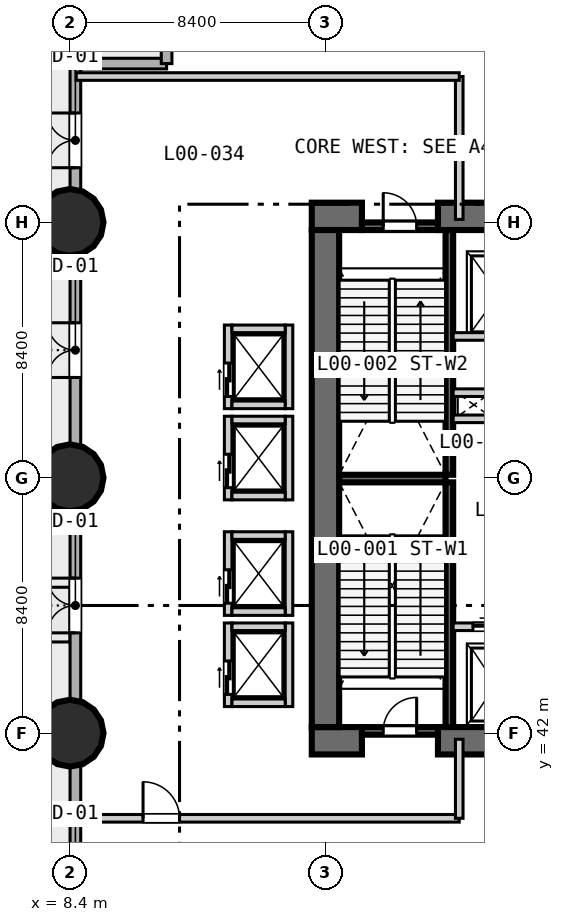
"""IFC4 building model, lengths in metres.
Left out: names, types, materials, properties, quantities, classifications, styles, units other than length and angle.
Written with IfcOpenShell. Run it as: python <this file> out.ifc"""

import sys

from ifc_helpers import new_model, si_unit, direction, frame, frame_2d, origin, origin_2d, place, context, subcontext, project, spatial, rectangle, circle, extrude, element, fill, save


model = new_model("IFC4")
c1 = context("Model", 3, precision=1e-05, world=origin(), true_north=direction((0.0, 1.0)))
c2 = subcontext(c1, "Body", "Model", "MODEL_VIEW")
j1 = project(units=[si_unit("LENGTHUNIT", "METRE"), si_unit("PLANEANGLEUNIT", "RADIAN")], contexts=[c1])
p1 = place(None, origin())
s1 = spatial("IfcSite", under=j1, at=p1, CompositionType="ELEMENT")
p2 = place(p1, origin())
s2 = spatial("IfcBuilding", under=s1, at=p2, CompositionType="ELEMENT")
p3 = place(p2, origin())
s3 = spatial("IfcBuildingStorey", under=s2, at=p3, CompositionType="ELEMENT", Elevation=0.0)
for number, where, z_axis, x_axis in (
    (1, (20.875, 42.2, 0.0), (0.0, 0.0, 1.0), (0.0, 1.0, 0.0)),
    (2, (20.875, 50.5, 0.0), (0.0, 0.0, 1.0), (0.0, 1.0, 0.0)),
):
    element("IfcWall", number, at=place(p3, frame(where, z_axis=z_axis, x_axis=x_axis)), inside=s3, PredefinedType="SOLIDWALL", context=c2, shape_type="SweptSolid", body=[
        extrude(rectangle(XDim=8.05, YDim=0.25, at=frame_2d((4.025, 0.0))), origin(), (0.0, 0.0, 1.0), 5.65),
    ])
p4 = place(p3, frame((17.25, 50.375, 0.0), z_axis=(0.0, 0.0, 1.0), x_axis=(1.0, 0.0, 0.0)))
e3 = element("IfcWall", 3, at=p4, inside=s3, PredefinedType="SOLIDWALL", context=c2, shape_type="SweptSolid", body=[
    extrude(rectangle(XDim=3.5, YDim=0.25, at=frame_2d((1.75, 0.0))), origin(), (0.0, 0.0, 1.0), 5.65),
])
p5 = place(p3, frame((16.35, 41.75, 0.0), z_axis=(0.0, 0.0, 1.0), x_axis=(1.0, 0.0, 0.0)))
e4 = element("IfcWall", 4, at=p5, inside=s3, PredefinedType="SHEAR", context=c2, shape_type="SweptSolid", body=[
    extrude(rectangle(XDim=1.65, YDim=0.9, at=frame_2d((0.825, 0.0))), origin(), (0.0, 0.0, 1.0), 5.65),
])
p6 = place(p3, frame((20.5, 41.75, 0.0), z_axis=(0.0, 0.0, 1.0), x_axis=(1.0, 0.0, 0.0)))
e5 = element("IfcWall", 5, at=p6, inside=s3, PredefinedType="SHEAR", context=c2, shape_type="SweptSolid", body=[
    extrude(rectangle(XDim=5.15, YDim=0.9, at=frame_2d((2.575, 0.0))), origin(), (0.0, 0.0, 1.0), 5.65),
])
p7 = place(p3, frame((16.35, 59.0, 0.0), z_axis=(0.0, 0.0, 1.0), x_axis=(1.0, 0.0, 0.0)))
e6 = element("IfcWall", 6, at=p7, inside=s3, PredefinedType="SHEAR", context=c2, shape_type="SweptSolid", body=[
    extrude(rectangle(XDim=1.65, YDim=0.9, at=frame_2d((0.825, 0.0))), origin(), (0.0, 0.0, 1.0), 5.65),
])
p8 = place(p3, frame((20.5, 59.0, 0.0), z_axis=(0.0, 0.0, 1.0), x_axis=(1.0, 0.0, 0.0)))
e7 = element("IfcWall", 7, at=p8, inside=s3, PredefinedType="SHEAR", context=c2, shape_type="SweptSolid", body=[
    extrude(rectangle(XDim=5.15, YDim=0.9, at=frame_2d((2.575, 0.0))), origin(), (0.0, 0.0, 1.0), 5.65),
])
p9 = place(p3, frame((16.8, 42.2, 0.0), z_axis=(0.0, 0.0, 1.0), x_axis=(0.0, 1.0, 0.0)))
e8 = element("IfcWall", 8, at=p9, inside=s3, PredefinedType="SHEAR", context=c2, shape_type="SweptSolid", body=[
    extrude(rectangle(XDim=16.35, YDim=0.9, at=frame_2d((8.175, 0.0))), origin(), (0.0, 0.0, 1.0), 5.65),
])
for number, where, z_axis, x_axis in (
    (9, (8.4, 42.0, 0.0), (0.0, 0.0, 1.0), (1.0, 0.0, 0.0)),
    (10, (8.4, 50.4, 0.0), (0.0, 0.0, 1.0), (1.0, 0.0, 0.0)),
    (11, (8.4, 58.8, 0.0), (0.0, 0.0, 1.0), (1.0, 0.0, 0.0)),
):
    element("IfcColumn", number, at=place(p3, frame(where, z_axis=z_axis, x_axis=x_axis)), inside=s3, PredefinedType="USERDEFINED", context=c2, shape_type="SweptSolid", body=[
        extrude(circle(Radius=1.1, at=origin_2d()), origin(), (0.0, 0.0, 1.0), 6.0),
    ])
p10 = place(p3, frame((8.575, 11.575, 0.0), z_axis=(0.0, 0.0, 1.0), x_axis=(0.0, 1.0, 0.0)))
e12 = element("IfcWall", 12, at=p10, inside=s3, PredefinedType="STANDARD", context=c2, shape_type="SweptSolid", body=[
    extrude(rectangle(XDim=52.45, YDim=0.35, at=frame_2d((26.225, 0.0))), origin(), (0.0, 0.0, 1.0), 4.8),
])
p11 = place(p10, frame((24.125, 0.0, 0.0)))
e13 = element("IfcOpeningElement", 13, at=p11, cuts=e12, PredefinedType="OPENING", context=c2, shape_type="SweptSolid", body=[
    extrude(rectangle(XDim=1.8, YDim=2.2, at=frame_2d((0.9, 1.1))), frame((0.0, 0.185, 0.0), z_axis=(0.0, -1.0, 0.0), x_axis=(1.0, 0.0, 0.0)), (0.0, 0.0, 1.0), 0.37),
])
p12 = place(p10, frame((33.725, 0.0, 0.0)))
e14 = element("IfcOpeningElement", 14, at=p12, cuts=e12, PredefinedType="OPENING", context=c2, shape_type="SweptSolid", body=[
    extrude(rectangle(XDim=1.8, YDim=2.2, at=frame_2d((0.9, 1.1))), frame((0.0, 0.185, 0.0), z_axis=(0.0, -1.0, 0.0), x_axis=(1.0, 0.0, 0.0)), (0.0, 0.0, 1.0), 0.37),
])
p13 = place(p10, frame((42.125, 0.0, 0.0)))
e15 = element("IfcOpeningElement", 15, at=p13, cuts=e12, PredefinedType="OPENING", context=c2, shape_type="SweptSolid", body=[
    extrude(rectangle(XDim=1.8, YDim=2.2, at=frame_2d((0.9, 1.1))), frame((0.0, 0.185, 0.0), z_axis=(0.0, -1.0, 0.0), x_axis=(1.0, 0.0, 0.0)), (0.0, 0.0, 1.0), 0.37),
])
p14 = place(p10, frame((49.025, 0.0, 0.0)))
e16 = element("IfcOpeningElement", 16, at=p14, cuts=e12, PredefinedType="OPENING", context=c2, shape_type="SweptSolid", body=[
    extrude(rectangle(XDim=1.8, YDim=2.2, at=frame_2d((0.9, 1.1))), frame((0.0, 0.185, 0.0), z_axis=(0.0, -1.0, 0.0), x_axis=(1.0, 0.0, 0.0)), (0.0, 0.0, 1.0), 0.37),
])
p15 = place(p10, frame((16.925, 0.0, 0.0)))
e17 = element("IfcOpeningElement", 17, at=p15, cuts=e12, PredefinedType="OPENING", context=c2, shape_type="SweptSolid", body=[
    extrude(rectangle(XDim=1.8, YDim=2.2, at=frame_2d((0.9, 1.1))), frame((0.0, 0.185, 0.0), z_axis=(0.0, -1.0, 0.0), x_axis=(1.0, 0.0, 0.0)), (0.0, 0.0, 1.0), 0.37),
])
p16 = place(p10, frame((8.825, 0.0, 0.0)))
e18 = element("IfcOpeningElement", 18, at=p16, cuts=e12, PredefinedType="OPENING", context=c2, shape_type="SweptSolid", body=[
    extrude(rectangle(XDim=1.2, YDim=2.15, at=frame_2d((0.6, 1.075))), frame((0.0, 0.185, 0.0), z_axis=(0.0, -1.0, 0.0), x_axis=(1.0, 0.0, 0.0)), (0.0, 0.0, 1.0), 0.37),
])
for number, where, z_axis, x_axis in (
    (19, (8.575, 64.025, 0.0), (0.0, 0.0, 1.0), (1.0, 0.0, 0.0)),
    (20, (11.575, 64.025, 0.0), (0.0, 0.0, 1.0), (0.0, 1.0, 0.0)),
):
    element("IfcWall", number, at=place(p3, frame(where, z_axis=z_axis, x_axis=x_axis)), inside=s3, PredefinedType="STANDARD", context=c2, shape_type="SweptSolid", body=[
        extrude(rectangle(XDim=3.0, YDim=0.35, at=frame_2d((1.5, 0.0))), origin(), (0.0, 0.0, 1.0), 5.65),
    ])
p17 = place(p3, frame((18.0, 42.075, 0.0), z_axis=(0.0, 0.0, 1.0), x_axis=(1.0, 0.0, 0.0)))
e21 = element("IfcWall", 21, at=p17, inside=s3, PredefinedType="SOLIDWALL", context=c2, shape_type="SweptSolid", body=[
    extrude(rectangle(XDim=2.5, YDim=0.25, at=frame_2d((1.25, 0.0))), origin(), (0.0, 0.0, 1.0), 5.65),
])
p18 = place(p17, frame((0.7, 0.0, 0.0)))
e22 = element("IfcOpeningElement", 22, at=p18, cuts=e21, PredefinedType="OPENING", context=c2, shape_type="SweptSolid", body=[
    extrude(rectangle(XDim=1.1, YDim=2.15, at=frame_2d((0.55, 1.075))), frame((0.0, 0.135, 0.0), z_axis=(0.0, -1.0, 0.0), x_axis=(1.0, 0.0, 0.0)), (0.0, 0.0, 1.0), 0.27),
])
p19 = place(p3, frame((18.0, 58.675, 0.0), z_axis=(0.0, 0.0, 1.0), x_axis=(1.0, 0.0, 0.0)))
e23 = element("IfcWall", 23, at=p19, inside=s3, PredefinedType="SOLIDWALL", context=c2, shape_type="SweptSolid", body=[
    extrude(rectangle(XDim=2.5, YDim=0.25, at=frame_2d((1.25, 0.0))), origin(), (0.0, 0.0, 1.0), 5.65),
])
p20 = place(p19, frame((0.7, 0.0, 0.0)))
e24 = element("IfcOpeningElement", 24, at=p20, cuts=e23, PredefinedType="OPENING", context=c2, shape_type="SweptSolid", body=[
    extrude(rectangle(XDim=1.1, YDim=2.15, at=frame_2d((0.55, 1.075))), frame((0.0, 0.135, 0.0), z_axis=(0.0, -1.0, 0.0), x_axis=(1.0, 0.0, 0.0)), (0.0, 0.0, 1.0), 0.27),
])
p21 = place(p3, frame((21.0, 45.5, 0.0), z_axis=(0.0, 0.0, 1.0), x_axis=(1.0, 0.0, 0.0)))
e25 = element("IfcWall", 25, at=p21, inside=s3, PredefinedType="SOLIDWALL", context=c2, shape_type="SweptSolid", body=[
    extrude(rectangle(XDim=4.15, YDim=0.25, at=frame_2d((2.075, 0.0))), origin(), (0.0, 0.0, 1.0), 5.65),
])
p22 = place(p21, frame((0.65, 0.0, 0.0)))
e26 = element("IfcOpeningElement", 26, at=p22, cuts=e25, PredefinedType="OPENING", context=c2, shape_type="SweptSolid", body=[
    extrude(rectangle(XDim=1.1, YDim=2.15, at=frame_2d((0.55, 1.075))), frame((0.0, 0.135, 0.0), z_axis=(0.0, -1.0, 0.0), x_axis=(1.0, 0.0, 0.0)), (0.0, 0.0, 1.0), 0.27),
])
p23 = place(p3, frame((21.0, 52.34, 0.0), z_axis=(0.0, 0.0, 1.0), x_axis=(1.0, 0.0, 0.0)))
e27 = element("IfcWall", 27, at=p23, inside=s3, PredefinedType="SOLIDWALL", context=c2, shape_type="SweptSolid", body=[
    extrude(rectangle(XDim=3.75, YDim=0.25, at=frame_2d((1.875, 0.0))), origin(), (0.0, 0.0, 1.0), 5.65),
])
p24 = place(p3, frame((21.0, 55.05, 0.0), z_axis=(0.0, 0.0, 1.0), x_axis=(1.0, 0.0, 0.0)))
e28 = element("IfcWall", 28, at=p24, inside=s3, PredefinedType="SOLIDWALL", context=c2, shape_type="SweptSolid", body=[
    extrude(rectangle(XDim=4.15, YDim=0.25, at=frame_2d((2.075, 0.0))), origin(), (0.0, 0.0, 1.0), 5.65),
])
p25 = place(p24, frame((1.85, 0.0, 0.0)))
e29 = element("IfcOpeningElement", 29, at=p25, cuts=e28, PredefinedType="OPENING", context=c2, shape_type="SweptSolid", body=[
    extrude(rectangle(XDim=1.1, YDim=2.15, at=frame_2d((0.55, 1.075))), frame((0.0, 0.135, 0.0), z_axis=(0.0, -1.0, 0.0), x_axis=(1.0, 0.0, 0.0)), (0.0, 0.0, 1.0), 0.27),
])
p26 = place(p3, frame((21.0, 53.2, 0.0), z_axis=(0.0, 0.0, 1.0), x_axis=(1.0, 0.0, 0.0)))
e30 = element("IfcWall", 30, at=p26, inside=s3, PredefinedType="SOLIDWALL", context=c2, shape_type="SweptSolid", body=[
    extrude(rectangle(XDim=1.3, YDim=0.25, at=frame_2d((0.65, 0.0))), origin(), (0.0, 0.0, 1.0), 5.65),
])
p27 = place(p3, frame((13.6, 42.875, 0.0), z_axis=(0.0, 0.0, 1.0), x_axis=(0.0, 1.0, 0.0)))
e31 = element("IfcWall", 31, at=p27, inside=s3, PredefinedType="SOLIDWALL", context=c2, shape_type="SweptSolid", body=[
    extrude(rectangle(XDim=2.75, YDim=0.25, at=frame_2d((1.375, 0.0))), origin(), (0.0, 0.0, 1.0), 5.65),
])
p28 = place(p27, frame((0.4, 0.0, 0.0)))
e32 = element("IfcOpeningElement", 32, at=p28, cuts=e31, PredefinedType="OPENING", context=c2, shape_type="SweptSolid", body=[
    extrude(rectangle(XDim=1.1, YDim=2.15, at=frame_2d((0.55, 1.075))), frame((0.0, 0.135, 0.0), z_axis=(0.0, -1.0, 0.0), x_axis=(1.0, 0.0, 0.0)), (0.0, 0.0, 1.0), 0.27),
])
p29 = place(p3, frame((15.6, 42.875, 0.0), z_axis=(0.0, 0.0, 1.0), x_axis=(0.0, 1.0, 0.0)))
e33 = element("IfcWall", 33, at=p29, inside=s3, PredefinedType="SOLIDWALL", context=c2, shape_type="SweptSolid", body=[
    extrude(rectangle(XDim=2.75, YDim=0.25, at=frame_2d((1.375, 0.0))), origin(), (0.0, 0.0, 1.0), 5.65),
])
for number, where, z_axis, x_axis in (
    (34, (13.725, 43.0, 0.0), (0.0, 0.0, 1.0), (1.0, 0.0, 0.0)),
    (35, (13.725, 45.5, 0.0), (0.0, 0.0, 1.0), (1.0, 0.0, 0.0)),
):
    element("IfcWall", number, at=place(p3, frame(where, z_axis=z_axis, x_axis=x_axis)), inside=s3, PredefinedType="SOLIDWALL", context=c2, shape_type="SweptSolid", body=[
        extrude(rectangle(XDim=1.75, YDim=0.25, at=frame_2d((0.875, 0.0))), origin(), (0.0, 0.0, 1.0), 5.65),
    ])
p30 = place(p3, frame((13.6, 45.875, 0.0), z_axis=(0.0, 0.0, 1.0), x_axis=(0.0, 1.0, 0.0)))
e36 = element("IfcWall", 36, at=p30, inside=s3, PredefinedType="SOLIDWALL", context=c2, shape_type="SweptSolid", body=[
    extrude(rectangle(XDim=2.75, YDim=0.25, at=frame_2d((1.375, 0.0))), origin(), (0.0, 0.0, 1.0), 5.65),
])
p31 = place(p30, frame((0.4, 0.0, 0.0)))
e37 = element("IfcOpeningElement", 37, at=p31, cuts=e36, PredefinedType="OPENING", context=c2, shape_type="SweptSolid", body=[
    extrude(rectangle(XDim=1.1, YDim=2.15, at=frame_2d((0.55, 1.075))), frame((0.0, 0.135, 0.0), z_axis=(0.0, -1.0, 0.0), x_axis=(1.0, 0.0, 0.0)), (0.0, 0.0, 1.0), 0.27),
])
p32 = place(p3, frame((15.6, 45.875, 0.0), z_axis=(0.0, 0.0, 1.0), x_axis=(0.0, 1.0, 0.0)))
e38 = element("IfcWall", 38, at=p32, inside=s3, PredefinedType="SOLIDWALL", context=c2, shape_type="SweptSolid", body=[
    extrude(rectangle(XDim=2.75, YDim=0.25, at=frame_2d((1.375, 0.0))), origin(), (0.0, 0.0, 1.0), 5.65),
])
for number, where, z_axis, x_axis in (
    (39, (13.725, 46.0, 0.0), (0.0, 0.0, 1.0), (1.0, 0.0, 0.0)),
    (40, (13.725, 48.5, 0.0), (0.0, 0.0, 1.0), (1.0, 0.0, 0.0)),
):
    element("IfcWall", number, at=place(p3, frame(where, z_axis=z_axis, x_axis=x_axis)), inside=s3, PredefinedType="SOLIDWALL", context=c2, shape_type="SweptSolid", body=[
        extrude(rectangle(XDim=1.75, YDim=0.25, at=frame_2d((0.875, 0.0))), origin(), (0.0, 0.0, 1.0), 5.65),
    ])
p33 = place(p3, frame((13.6, 49.675, 0.0), z_axis=(0.0, 0.0, 1.0), x_axis=(0.0, 1.0, 0.0)))
e41 = element("IfcWall", 41, at=p33, inside=s3, PredefinedType="SOLIDWALL", context=c2, shape_type="SweptSolid", body=[
    extrude(rectangle(XDim=2.75, YDim=0.25, at=frame_2d((1.375, 0.0))), origin(), (0.0, 0.0, 1.0), 5.65),
])
p34 = place(p33, frame((0.4, 0.0, 0.0)))
e42 = element("IfcOpeningElement", 42, at=p34, cuts=e41, PredefinedType="OPENING", context=c2, shape_type="SweptSolid", body=[
    extrude(rectangle(XDim=1.1, YDim=2.15, at=frame_2d((0.55, 1.075))), frame((0.0, 0.135, 0.0), z_axis=(0.0, -1.0, 0.0), x_axis=(1.0, 0.0, 0.0)), (0.0, 0.0, 1.0), 0.27),
])
p35 = place(p3, frame((15.6, 49.675, 0.0), z_axis=(0.0, 0.0, 1.0), x_axis=(0.0, 1.0, 0.0)))
e43 = element("IfcWall", 43, at=p35, inside=s3, PredefinedType="SOLIDWALL", context=c2, shape_type="SweptSolid", body=[
    extrude(rectangle(XDim=2.75, YDim=0.25, at=frame_2d((1.375, 0.0))), origin(), (0.0, 0.0, 1.0), 5.65),
])
for number, where, z_axis, x_axis in (
    (44, (13.725, 49.8, 0.0), (0.0, 0.0, 1.0), (1.0, 0.0, 0.0)),
    (45, (13.725, 52.3, 0.0), (0.0, 0.0, 1.0), (1.0, 0.0, 0.0)),
):
    element("IfcWall", number, at=place(p3, frame(where, z_axis=z_axis, x_axis=x_axis)), inside=s3, PredefinedType="SOLIDWALL", context=c2, shape_type="SweptSolid", body=[
        extrude(rectangle(XDim=1.75, YDim=0.25, at=frame_2d((0.875, 0.0))), origin(), (0.0, 0.0, 1.0), 5.65),
    ])
p36 = place(p3, frame((13.6, 52.675, 0.0), z_axis=(0.0, 0.0, 1.0), x_axis=(0.0, 1.0, 0.0)))
e46 = element("IfcWall", 46, at=p36, inside=s3, PredefinedType="SOLIDWALL", context=c2, shape_type="SweptSolid", body=[
    extrude(rectangle(XDim=2.75, YDim=0.25, at=frame_2d((1.375, 0.0))), origin(), (0.0, 0.0, 1.0), 5.65),
])
p37 = place(p36, frame((0.4, 0.0, 0.0)))
e47 = element("IfcOpeningElement", 47, at=p37, cuts=e46, PredefinedType="OPENING", context=c2, shape_type="SweptSolid", body=[
    extrude(rectangle(XDim=1.1, YDim=2.15, at=frame_2d((0.55, 1.075))), frame((0.0, 0.135, 0.0), z_axis=(0.0, -1.0, 0.0), x_axis=(1.0, 0.0, 0.0)), (0.0, 0.0, 1.0), 0.27),
])
p38 = place(p3, frame((15.6, 52.675, 0.0), z_axis=(0.0, 0.0, 1.0), x_axis=(0.0, 1.0, 0.0)))
e48 = element("IfcWall", 48, at=p38, inside=s3, PredefinedType="SOLIDWALL", context=c2, shape_type="SweptSolid", body=[
    extrude(rectangle(XDim=2.75, YDim=0.25, at=frame_2d((1.375, 0.0))), origin(), (0.0, 0.0, 1.0), 5.65),
])
for number, where, z_axis, x_axis in (
    (49, (13.725, 52.8, 0.0), (0.0, 0.0, 1.0), (1.0, 0.0, 0.0)),
    (50, (13.725, 55.3, 0.0), (0.0, 0.0, 1.0), (1.0, 0.0, 0.0)),
):
    element("IfcWall", number, at=place(p3, frame(where, z_axis=z_axis, x_axis=x_axis)), inside=s3, PredefinedType="SOLIDWALL", context=c2, shape_type="SweptSolid", body=[
        extrude(rectangle(XDim=1.75, YDim=0.25, at=frame_2d((0.875, 0.0))), origin(), (0.0, 0.0, 1.0), 5.65),
    ])
p39 = place(p3, frame((8.6, 39.2, 0.0), z_axis=(0.0, 0.0, 1.0), x_axis=(1.0, 0.0, 0.0)))
e51 = element("IfcWall", 51, at=p39, inside=s3, PredefinedType="SOLIDWALL", context=c2, shape_type="SweptSolid", body=[
    extrude(rectangle(XDim=12.6, YDim=0.25, at=frame_2d((6.3, 0.0))), origin(), (0.0, 0.0, 1.0), 5.65),
])
p40 = place(p39, frame((2.2, 0.0, 0.0)))
e52 = element("IfcOpeningElement", 52, at=p40, cuts=e51, PredefinedType="OPENING", context=c2, shape_type="SweptSolid", body=[
    extrude(rectangle(XDim=1.2, YDim=2.15, at=frame_2d((0.6, 1.075))), frame((0.0, 0.135, 0.0), z_axis=(0.0, -1.0, 0.0), x_axis=(1.0, 0.0, 0.0)), (0.0, 0.0, 1.0), 0.27),
])
p41 = place(p3, frame((21.2, 39.2, 0.0), z_axis=(0.0, 0.0, 1.0), x_axis=(0.0, 1.0, 0.0)))
e53 = element("IfcWall", 53, at=p41, inside=s3, PredefinedType="SOLIDWALL", context=c2, shape_type="SweptSolid", body=[
    extrude(rectangle(XDim=2.6, YDim=0.25, at=frame_2d((1.3, 0.0))), origin(), (0.0, 0.0, 1.0), 5.65),
])
p42 = place(p3, frame((21.2, 58.9, 0.0), z_axis=(0.0, 0.0, 1.0), x_axis=(0.0, 1.0, 0.0)))
e54 = element("IfcWall", 54, at=p42, inside=s3, PredefinedType="SOLIDWALL", context=c2, shape_type="SweptSolid", body=[
    extrude(rectangle(XDim=4.7, YDim=0.25, at=frame_2d((2.35, 0.0))), origin(), (0.0, 0.0, 1.0), 5.65),
])
p43 = place(p3, frame((8.6, 63.6, 0.0), z_axis=(0.0, 0.0, 1.0), x_axis=(1.0, 0.0, 0.0)))
e55 = element("IfcWall", 55, at=p43, inside=s3, PredefinedType="SOLIDWALL", context=c2, shape_type="SweptSolid", body=[
    extrude(rectangle(XDim=12.6, YDim=0.25, at=frame_2d((6.3, 0.0))), origin(), (0.0, 0.0, 1.0), 5.65),
])
p44 = place(p12, origin())
e56 = element("IfcDoor", 56, at=p44, inside=s3, OperationType="DOUBLE_SWING_LEFT", PredefinedType="DOOR", context=c2, shape_type="SweptSolid", body=[
    extrude(rectangle(XDim=1.8, YDim=2.2, at=frame_2d((0.9, 1.1))), frame((0.0, 0.025, 0.0), z_axis=(0.0, -1.0, 0.0), x_axis=(1.0, 0.0, 0.0)), (0.0, 0.0, 1.0), 0.05),
])
fill(e14, e56)
p45 = place(p13, origin())
e57 = element("IfcDoor", 57, at=p45, inside=s3, OperationType="DOUBLE_SWING_LEFT", PredefinedType="DOOR", context=c2, shape_type="SweptSolid", body=[
    extrude(rectangle(XDim=1.8, YDim=2.2, at=frame_2d((0.9, 1.1))), frame((0.0, 0.025, 0.0), z_axis=(0.0, -1.0, 0.0), x_axis=(1.0, 0.0, 0.0)), (0.0, 0.0, 1.0), 0.05),
])
fill(e15, e57)
p46 = place(p14, origin())
e58 = element("IfcDoor", 58, at=p46, inside=s3, OperationType="DOUBLE_SWING_LEFT", PredefinedType="DOOR", context=c2, shape_type="SweptSolid", body=[
    extrude(rectangle(XDim=1.8, YDim=2.2, at=frame_2d((0.9, 1.1))), frame((0.0, 0.025, 0.0), z_axis=(0.0, -1.0, 0.0), x_axis=(1.0, 0.0, 0.0)), (0.0, 0.0, 1.0), 0.05),
])
fill(e16, e58)
p47 = place(p18, origin())
e59 = element("IfcDoor", 59, at=p47, inside=s3, OperationType="SINGLE_SWING_RIGHT", PredefinedType="DOOR", context=c2, shape_type="SweptSolid", body=[
    extrude(rectangle(XDim=1.1, YDim=2.15, at=frame_2d((0.55, 1.075))), frame((0.0, 0.025, 0.0), z_axis=(0.0, -1.0, 0.0), x_axis=(1.0, 0.0, 0.0)), (0.0, 0.0, 1.0), 0.05),
])
fill(e22, e59)
p48 = place(p20, origin())
e60 = element("IfcDoor", 60, at=p48, inside=s3, OperationType="SINGLE_SWING_LEFT", PredefinedType="DOOR", context=c2, shape_type="SweptSolid", body=[
    extrude(rectangle(XDim=1.1, YDim=2.15, at=frame_2d((0.55, 1.075))), frame((0.0, 0.025, 0.0), z_axis=(0.0, -1.0, 0.0), x_axis=(1.0, 0.0, 0.0)), (0.0, 0.0, 1.0), 0.05),
])
fill(e24, e60)
p49 = place(p22, origin())
e61 = element("IfcDoor", 61, at=p49, inside=s3, OperationType="SLIDING_TO_LEFT", PredefinedType="DOOR", context=c2, shape_type="SweptSolid", body=[
    extrude(rectangle(XDim=1.1, YDim=2.15, at=frame_2d((0.55, 1.075))), frame((0.0, 0.025, 0.0), z_axis=(0.0, -1.0, 0.0), x_axis=(1.0, 0.0, 0.0)), (0.0, 0.0, 1.0), 0.05),
])
fill(e26, e61)
p50 = place(p28, origin())
e62 = element("IfcDoor", 62, at=p50, inside=s3, OperationType="SLIDING_TO_LEFT", PredefinedType="DOOR", context=c2, shape_type="SweptSolid", body=[
    extrude(rectangle(XDim=1.1, YDim=2.15, at=frame_2d((0.55, 1.075))), frame((0.0, 0.025, 0.0), z_axis=(0.0, -1.0, 0.0), x_axis=(1.0, 0.0, 0.0)), (0.0, 0.0, 1.0), 0.05),
])
fill(e32, e62)
p51 = place(p31, origin())
e63 = element("IfcDoor", 63, at=p51, inside=s3, OperationType="SLIDING_TO_LEFT", PredefinedType="DOOR", context=c2, shape_type="SweptSolid", body=[
    extrude(rectangle(XDim=1.1, YDim=2.15, at=frame_2d((0.55, 1.075))), frame((0.0, 0.025, 0.0), z_axis=(0.0, -1.0, 0.0), x_axis=(1.0, 0.0, 0.0)), (0.0, 0.0, 1.0), 0.05),
])
fill(e37, e63)
p52 = place(p34, origin())
e64 = element("IfcDoor", 64, at=p52, inside=s3, OperationType="SLIDING_TO_LEFT", PredefinedType="DOOR", context=c2, shape_type="SweptSolid", body=[
    extrude(rectangle(XDim=1.1, YDim=2.15, at=frame_2d((0.55, 1.075))), frame((0.0, 0.025, 0.0), z_axis=(0.0, -1.0, 0.0), x_axis=(1.0, 0.0, 0.0)), (0.0, 0.0, 1.0), 0.05),
])
fill(e42, e64)
p53 = place(p37, origin())
e65 = element("IfcDoor", 65, at=p53, inside=s3, OperationType="SLIDING_TO_LEFT", PredefinedType="DOOR", context=c2, shape_type="SweptSolid", body=[
    extrude(rectangle(XDim=1.1, YDim=2.15, at=frame_2d((0.55, 1.075))), frame((0.0, 0.025, 0.0), z_axis=(0.0, -1.0, 0.0), x_axis=(1.0, 0.0, 0.0)), (0.0, 0.0, 1.0), 0.05),
])
fill(e47, e65)
p54 = place(p40, origin())
e66 = element("IfcDoor", 66, at=p54, inside=s3, OperationType="SINGLE_SWING_LEFT", PredefinedType="DOOR", context=c2, shape_type="SweptSolid", body=[
    extrude(rectangle(XDim=1.2, YDim=2.15, at=frame_2d((0.6, 1.075))), frame((0.0, 0.025, 0.0), z_axis=(0.0, -1.0, 0.0), x_axis=(1.0, 0.0, 0.0)), (0.0, 0.0, 1.0), 0.05),
])
fill(e52, e66)
save(model, sys.argv[1])
